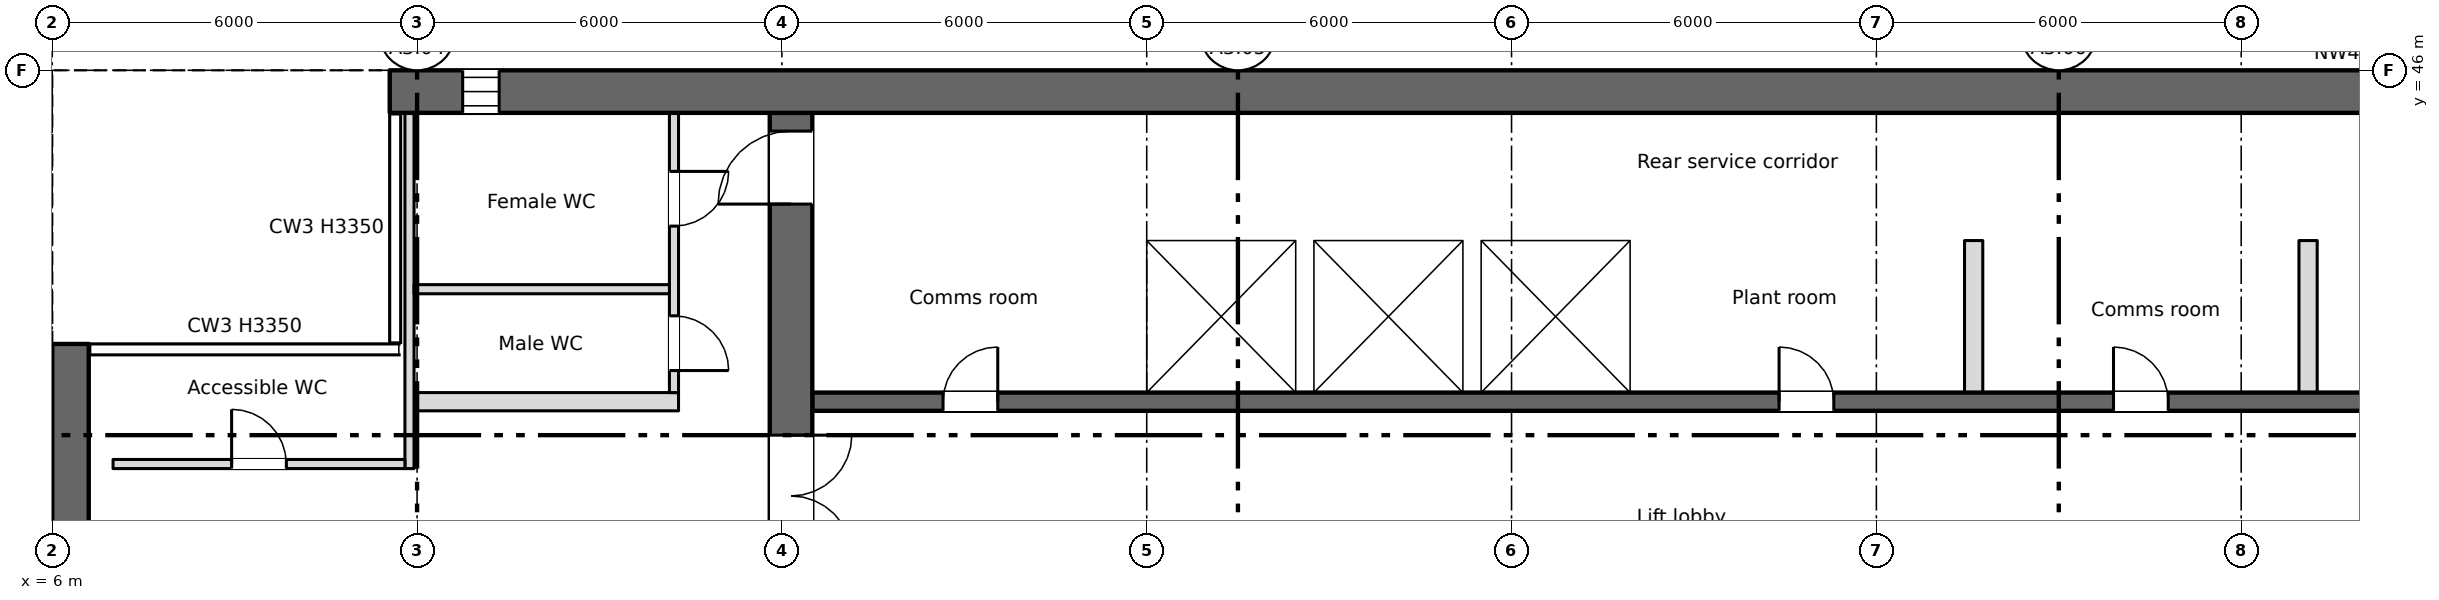
"""IFC4 building model, lengths in metres.
Left out: names, types, materials, properties, quantities, classifications, styles, units other than length and angle.
Written with IfcOpenShell. Run it as: python <this file> out.ifc"""

import sys

from ifc_helpers import new_model, si_unit, direction, frame, frame_2d, origin, place, context, subcontext, project, spatial, rectangle, extrude, element, fill, save


model = new_model("IFC4")
c1 = context("Model", 3, precision=1e-05, world=origin(), true_north=direction((0.0, 1.0)))
c2 = subcontext(c1, "Body", "Model", "MODEL_VIEW")
j1 = project(units=[si_unit("LENGTHUNIT", "METRE"), si_unit("PLANEANGLEUNIT", "RADIAN")], contexts=[c1])
p1 = place(None, origin())
s1 = spatial("IfcSite", under=j1, at=p1, CompositionType="ELEMENT")
p2 = place(p1, origin())
s2 = spatial("IfcBuilding", under=s1, at=p2, CompositionType="ELEMENT")
p3 = place(p2, frame((0.0, 0.0, 185.5)))
s3 = spatial("IfcBuildingStorey", under=s2, at=p3, CompositionType="ELEMENT", Elevation=185.5)
p4 = place(p3, frame((6.3, 7.5, 0.0), z_axis=(0.0, 0.0, 1.0), x_axis=(0.0, 1.0, 0.0)))
e1 = element("IfcWall", 1, at=p4, inside=s3, PredefinedType="SHEAR", context=c2, shape_type="SweptSolid", body=[
    extrude(rectangle(XDim=34.0, YDim=0.6, at=frame_2d((17.0, 0.0))), origin(), (0.0, 0.0, 1.0), 3.35),
])
p5 = place(p4, frame((1.2, 0.0, 0.6)))
e2 = element("IfcOpeningElement", 2, at=p5, cuts=e1, PredefinedType="OPENING", context=c2, shape_type="SweptSolid", body=[
    extrude(rectangle(XDim=0.6, YDim=2.4, at=frame_2d((0.3, 1.2))), frame((0.0, 0.31, 0.0), z_axis=(0.0, -1.0, 0.0), x_axis=(1.0, 0.0, 0.0)), (0.0, 0.0, 1.0), 0.62),
])
p6 = place(p4, frame((7.2, 0.0, 0.6)))
e3 = element("IfcOpeningElement", 3, at=p6, cuts=e1, PredefinedType="OPENING", context=c2, shape_type="SweptSolid", body=[
    extrude(rectangle(XDim=0.6, YDim=2.4, at=frame_2d((0.3, 1.2))), frame((0.0, 0.31, 0.0), z_axis=(0.0, -1.0, 0.0), x_axis=(1.0, 0.0, 0.0)), (0.0, 0.0, 1.0), 0.62),
])
p7 = place(p4, frame((13.2, 0.0, 0.6)))
e4 = element("IfcOpeningElement", 4, at=p7, cuts=e1, PredefinedType="OPENING", context=c2, shape_type="SweptSolid", body=[
    extrude(rectangle(XDim=0.6, YDim=2.4, at=frame_2d((0.3, 1.2))), frame((0.0, 0.31, 0.0), z_axis=(0.0, -1.0, 0.0), x_axis=(1.0, 0.0, 0.0)), (0.0, 0.0, 1.0), 0.62),
])
p8 = place(p4, frame((19.2, 0.0, 0.6)))
e5 = element("IfcOpeningElement", 5, at=p8, cuts=e1, PredefinedType="OPENING", context=c2, shape_type="SweptSolid", body=[
    extrude(rectangle(XDim=0.6, YDim=2.4, at=frame_2d((0.3, 1.2))), frame((0.0, 0.31, 0.0), z_axis=(0.0, -1.0, 0.0), x_axis=(1.0, 0.0, 0.0)), (0.0, 0.0, 1.0), 0.62),
])
p9 = place(p3, frame((11.55, 45.65, 0.0), z_axis=(0.0, 0.0, 1.0), x_axis=(1.0, 0.0, 0.0)))
e6 = element("IfcWall", 6, at=p9, inside=s3, PredefinedType="SHEAR", context=c2, shape_type="SweptSolid", body=[
    extrude(rectangle(XDim=54.9, YDim=0.7, at=frame_2d((27.45, 0.0))), origin(), (0.0, 0.0, 1.0), 3.35),
])
p10 = place(p9, frame((1.2, 0.0, 0.6)))
e7 = element("IfcOpeningElement", 7, at=p10, cuts=e6, PredefinedType="OPENING", context=c2, shape_type="SweptSolid", body=[
    extrude(rectangle(XDim=0.6, YDim=2.4, at=frame_2d((0.3, 1.2))), frame((0.0, 0.36, 0.0), z_axis=(0.0, -1.0, 0.0), x_axis=(1.0, 0.0, 0.0)), (0.0, 0.0, 1.0), 0.72),
])
p11 = place(p9, frame((49.2, 0.0, 0.6)))
e8 = element("IfcOpeningElement", 8, at=p11, cuts=e6, PredefinedType="OPENING", context=c2, shape_type="SweptSolid", body=[
    extrude(rectangle(XDim=0.6, YDim=2.4, at=frame_2d((0.3, 1.2))), frame((0.0, 0.36, 0.0), z_axis=(0.0, -1.0, 0.0), x_axis=(1.0, 0.0, 0.0)), (0.0, 0.0, 1.0), 0.72),
])
p12 = place(p3, frame((6.8, 28.4, 0.0), z_axis=(0.0, 0.0, 1.0), x_axis=(0.0, 1.0, 0.0)))
e9 = element("IfcWall", 9, at=p12, inside=s3, PredefinedType="SHEAR", context=c2, shape_type="SweptSolid", body=[
    extrude(rectangle(XDim=12.85, YDim=0.4, at=frame_2d((6.425, 0.0))), origin(), (0.0, 0.0, 1.0), 3.35),
])
p13 = place(p3, frame((18.15, 28.4, 0.0), z_axis=(0.0, 0.0, 1.0), x_axis=(0.0, 1.0, 0.0)))
e10 = element("IfcWall", 10, at=p13, inside=s3, PredefinedType="SHEAR", context=c2, shape_type="SweptSolid", body=[
    extrude(rectangle(XDim=16.9, YDim=0.7, at=frame_2d((8.45, 0.0))), origin(), (0.0, 0.0, 1.0), 3.35),
])
p14 = place(p13, frame((9.6, 0.0, 0.0)))
e11 = element("IfcOpeningElement", 11, at=p14, cuts=e10, PredefinedType="OPENING", context=c2, shape_type="SweptSolid", body=[
    extrude(rectangle(XDim=2.0, YDim=2.1, at=frame_2d((1.0, 1.05))), frame((0.0, 0.36, 0.0), z_axis=(0.0, -1.0, 0.0), x_axis=(1.0, 0.0, 0.0)), (0.0, 0.0, 1.0), 0.72),
])
p15 = place(p13, frame((15.4, 0.0, 0.0)))
e12 = element("IfcOpeningElement", 12, at=p15, cuts=e10, PredefinedType="OPENING", context=c2, shape_type="SweptSolid", body=[
    extrude(rectangle(XDim=1.2, YDim=2.1, at=frame_2d((0.6, 1.05))), frame((0.0, 0.36, 0.0), z_axis=(0.0, -1.0, 0.0), x_axis=(1.0, 0.0, 0.0)), (0.0, 0.0, 1.0), 0.72),
])
p16 = place(p3, frame((18.5, 40.55, 0.0), z_axis=(0.0, 0.0, 1.0), x_axis=(1.0, 0.0, 0.0)))
e13 = element("IfcWall", 13, at=p16, inside=s3, PredefinedType="SHEAR", context=c2, shape_type="SweptSolid", body=[
    extrude(rectangle(XDim=41.0, YDim=0.3, at=frame_2d((20.5, 0.0))), origin(), (0.0, 0.0, 1.0), 3.35),
])
p17 = place(p16, frame((2.15, 0.0, 0.0)))
e14 = element("IfcOpeningElement", 14, at=p17, cuts=e13, PredefinedType="OPENING", context=c2, shape_type="SweptSolid", body=[
    extrude(rectangle(XDim=0.9, YDim=2.1, at=frame_2d((0.45, 1.05))), frame((0.0, 0.16, 0.0), z_axis=(0.0, -1.0, 0.0), x_axis=(1.0, 0.0, 0.0)), (0.0, 0.0, 1.0), 0.32),
])
p18 = place(p16, frame((15.9, 0.0, 0.0)))
e15 = element("IfcOpeningElement", 15, at=p18, cuts=e13, PredefinedType="OPENING", context=c2, shape_type="SweptSolid", body=[
    extrude(rectangle(XDim=0.9, YDim=2.1, at=frame_2d((0.45, 1.05))), frame((0.0, 0.16, 0.0), z_axis=(0.0, -1.0, 0.0), x_axis=(1.0, 0.0, 0.0)), (0.0, 0.0, 1.0), 0.32),
])
p19 = place(p16, frame((21.4, 0.0, 0.0)))
e16 = element("IfcOpeningElement", 16, at=p19, cuts=e13, PredefinedType="OPENING", context=c2, shape_type="SweptSolid", body=[
    extrude(rectangle(XDim=0.9, YDim=2.1, at=frame_2d((0.45, 1.05))), frame((0.0, 0.16, 0.0), z_axis=(0.0, -1.0, 0.0), x_axis=(1.0, 0.0, 0.0)), (0.0, 0.0, 1.0), 0.32),
])
p20 = place(p16, frame((26.9, 0.0, 0.0)))
e17 = element("IfcOpeningElement", 17, at=p20, cuts=e13, PredefinedType="OPENING", context=c2, shape_type="SweptSolid", body=[
    extrude(rectangle(XDim=0.9, YDim=2.1, at=frame_2d((0.45, 1.05))), frame((0.0, 0.16, 0.0), z_axis=(0.0, -1.0, 0.0), x_axis=(1.0, 0.0, 0.0)), (0.0, 0.0, 1.0), 0.32),
])
p21 = place(p16, frame((6.175, 0.0, 0.0)))
e18 = element("IfcOpeningElement", 18, at=p21, cuts=e13, PredefinedType="OPENING", context=c2, shape_type="SweptSolid", body=[
    extrude(rectangle(XDim=1.1, YDim=2.1, at=frame_2d((0.55, 1.05))), frame((0.0, 0.16, 0.0), z_axis=(0.0, -1.0, 0.0), x_axis=(1.0, 0.0, 0.0)), (0.0, 0.0, 1.0), 0.32),
])
p22 = place(p16, frame((8.925, 0.0, 0.0)))
e19 = element("IfcOpeningElement", 19, at=p22, cuts=e13, PredefinedType="OPENING", context=c2, shape_type="SweptSolid", body=[
    extrude(rectangle(XDim=1.1, YDim=2.1, at=frame_2d((0.55, 1.05))), frame((0.0, 0.16, 0.0), z_axis=(0.0, -1.0, 0.0), x_axis=(1.0, 0.0, 0.0)), (0.0, 0.0, 1.0), 0.32),
])
p23 = place(p16, frame((11.675, 0.0, 0.0)))
e20 = element("IfcOpeningElement", 20, at=p23, cuts=e13, PredefinedType="OPENING", context=c2, shape_type="SweptSolid", body=[
    extrude(rectangle(XDim=1.1, YDim=2.1, at=frame_2d((0.55, 1.05))), frame((0.0, 0.16, 0.0), z_axis=(0.0, -1.0, 0.0), x_axis=(1.0, 0.0, 0.0)), (0.0, 0.0, 1.0), 0.32),
])
p24 = place(p16, frame((30.925, 0.0, 0.0)))
e21 = element("IfcOpeningElement", 21, at=p24, cuts=e13, PredefinedType="OPENING", context=c2, shape_type="SweptSolid", body=[
    extrude(rectangle(XDim=1.1, YDim=2.1, at=frame_2d((0.55, 1.05))), frame((0.0, 0.16, 0.0), z_axis=(0.0, -1.0, 0.0), x_axis=(1.0, 0.0, 0.0)), (0.0, 0.0, 1.0), 0.32),
])
p25 = place(p16, frame((33.675, 0.0, 0.0)))
e22 = element("IfcOpeningElement", 22, at=p25, cuts=e13, PredefinedType="OPENING", context=c2, shape_type="SweptSolid", body=[
    extrude(rectangle(XDim=1.1, YDim=2.1, at=frame_2d((0.55, 1.05))), frame((0.0, 0.16, 0.0), z_axis=(0.0, -1.0, 0.0), x_axis=(1.0, 0.0, 0.0)), (0.0, 0.0, 1.0), 0.32),
])
p26 = place(p16, frame((36.375, 0.0, 0.0)))
e23 = element("IfcOpeningElement", 23, at=p26, cuts=e13, PredefinedType="OPENING", context=c2, shape_type="SweptSolid", body=[
    extrude(rectangle(XDim=1.2, YDim=2.1, at=frame_2d((0.6, 1.05))), frame((0.0, 0.16, 0.0), z_axis=(0.0, -1.0, 0.0), x_axis=(1.0, 0.0, 0.0)), (0.0, 0.0, 1.0), 0.32),
])
p27 = place(p16, frame((39.15, 0.0, 0.0)))
e24 = element("IfcOpeningElement", 24, at=p27, cuts=e13, PredefinedType="OPENING", context=c2, shape_type="SweptSolid", body=[
    extrude(rectangle(XDim=1.2, YDim=2.1, at=frame_2d((0.6, 1.05))), frame((0.0, 0.16, 0.0), z_axis=(0.0, -1.0, 0.0), x_axis=(1.0, 0.0, 0.0)), (0.0, 0.0, 1.0), 0.32),
])
p28 = place(p3, frame((18.5, 43.35, 0.0), z_axis=(0.0, 0.0, 1.0), x_axis=(1.0, 0.0, 0.0)))
e25 = element("IfcWall", 25, at=p28, inside=s3, PredefinedType="SHEAR", context=c2, shape_type="SweptSolid", body=[
    extrude(rectangle(XDim=41.0, YDim=0.3, at=frame_2d((20.5, 0.0))), origin(), (0.0, 0.0, 1.0), 3.35),
])
p29 = place(p3, frame((11.95, 40.55, 0.0), z_axis=(0.0, 0.0, 1.0), x_axis=(1.0, 0.0, 0.0)))
e26 = element("IfcWall", 26, at=p29, inside=s3, PredefinedType="PARTITIONING", context=c2, shape_type="SweptSolid", body=[
    extrude(rectangle(XDim=4.35, YDim=0.3, at=frame_2d((2.175, 0.0))), origin(), (0.0, 0.0, 1.0), 3.35),
])
for number, where, z_axis, x_axis in (
    (27, (23.85, 40.7, 0.0), (0.0, 0.0, 1.0), (0.0, 1.0, 0.0)),
    (28, (26.6, 40.7, 0.0), (0.0, 0.0, 1.0), (0.0, 1.0, 0.0)),
    (29, (29.35, 40.7, 0.0), (0.0, 0.0, 1.0), (0.0, 1.0, 0.0)),
    (30, (32.1, 40.7, 0.0), (0.0, 0.0, 1.0), (0.0, 1.0, 0.0)),
):
    element("IfcWall", number, at=place(p3, frame(where, z_axis=z_axis, x_axis=x_axis)), inside=s3, PredefinedType="SHEAR", context=c2, shape_type="SweptSolid", body=[
        extrude(rectangle(XDim=2.5, YDim=0.3, at=frame_2d((1.25, 0.0))), origin(), (0.0, 0.0, 1.0), 3.35),
    ])
p30 = place(p3, frame((16.225, 45.3, 0.0), z_axis=(0.0, 0.0, 1.0), x_axis=(0.0, -1.0, 0.0)))
e31 = element("IfcWall", 31, at=p30, inside=s3, PredefinedType="PARTITIONING", context=c2, shape_type="SweptSolid", body=[
    extrude(rectangle(XDim=4.6, YDim=0.15, at=frame_2d((2.3, 0.0))), origin(), (0.0, 0.0, 1.0), 3.35),
])
p31 = place(p30, frame((3.337, 0.0, 0.0)))
e32 = element("IfcOpeningElement", 32, at=p31, cuts=e31, PredefinedType="OPENING", context=c2, shape_type="SweptSolid", body=[
    extrude(rectangle(XDim=0.9, YDim=2.1, at=frame_2d((0.45, 1.05))), frame((0.0, 0.085, 0.0), z_axis=(0.0, -1.0, 0.0), x_axis=(1.0, 0.0, 0.0)), (0.0, 0.0, 1.0), 0.17),
])
p32 = place(p30, frame((0.962, 0.0, 0.0)))
e33 = element("IfcOpeningElement", 33, at=p32, cuts=e31, PredefinedType="OPENING", context=c2, shape_type="SweptSolid", body=[
    extrude(rectangle(XDim=0.9, YDim=2.1, at=frame_2d((0.45, 1.05))), frame((0.0, 0.085, 0.0), z_axis=(0.0, -1.0, 0.0), x_axis=(1.0, 0.0, 0.0)), (0.0, 0.0, 1.0), 0.17),
])
p33 = place(p3, frame((11.875, 39.45, 0.0), z_axis=(0.0, 0.0, 1.0), x_axis=(0.0, 1.0, 0.0)))
e34 = element("IfcWall", 34, at=p33, inside=s3, PredefinedType="PARTITIONING", context=c2, shape_type="SweptSolid", body=[
    extrude(rectangle(XDim=5.85, YDim=0.15, at=frame_2d((2.925, 0.0))), origin(), (0.0, 0.0, 1.0), 3.35),
])
p34 = place(p3, frame((7.0, 39.525, 0.0), z_axis=(0.0, 0.0, 1.0), x_axis=(1.0, 0.0, 0.0)))
e35 = element("IfcWall", 35, at=p34, inside=s3, PredefinedType="PARTITIONING", context=c2, shape_type="SweptSolid", body=[
    extrude(rectangle(XDim=4.8, YDim=0.15, at=frame_2d((2.4, 0.0))), origin(), (0.0, 0.0, 1.0), 3.35),
])
p35 = place(p34, frame((1.95, 0.0, 0.0)))
e36 = element("IfcOpeningElement", 36, at=p35, cuts=e35, PredefinedType="OPENING", context=c2, shape_type="SweptSolid", body=[
    extrude(rectangle(XDim=0.9, YDim=2.1, at=frame_2d((0.45, 1.05))), frame((0.0, 0.085, 0.0), z_axis=(0.0, -1.0, 0.0), x_axis=(1.0, 0.0, 0.0)), (0.0, 0.0, 1.0), 0.17),
])
p36 = place(p3, frame((11.95, 42.4, 0.0), z_axis=(0.0, 0.0, 1.0), x_axis=(1.0, 0.0, 0.0)))
e37 = element("IfcWall", 37, at=p36, inside=s3, PredefinedType="PARTITIONING", context=c2, shape_type="SweptSolid", body=[
    extrude(rectangle(XDim=4.2, YDim=0.15, at=frame_2d((2.1, 0.0))), origin(), (0.0, 0.0, 1.0), 3.35),
])
for number, where, z_axis, x_axis in (
    (38, (37.6, 40.7, 0.0), (0.0, 0.0, 1.0), (0.0, 1.0, 0.0)),
    (39, (43.1, 40.7, 0.0), (0.0, 0.0, 1.0), (0.0, 1.0, 0.0)),
):
    element("IfcWall", number, at=place(p3, frame(where, z_axis=z_axis, x_axis=x_axis)), inside=s3, PredefinedType="PARTITIONING", context=c2, shape_type="SweptSolid", body=[
        extrude(rectangle(XDim=2.5, YDim=0.3, at=frame_2d((1.25, 0.0))), origin(), (0.0, 0.0, 1.0), 3.35),
    ])
p37 = place(p10, origin())
e40 = element("IfcWindow", 40, at=p37, inside=s3, PartitioningType="SINGLE_PANEL", PredefinedType="WINDOW", context=c2, shape_type="SweptSolid", body=[
    extrude(rectangle(XDim=0.6, YDim=2.4, at=frame_2d((0.3, 1.2))), frame((0.0, 0.03, 0.0), z_axis=(0.0, -1.0, 0.0), x_axis=(1.0, 0.0, 0.0)), (0.0, 0.0, 1.0), 0.06),
])
fill(e7, e40)
p38 = place(p35, origin())
e41 = element("IfcDoor", 41, at=p38, inside=s3, OperationType="SINGLE_SWING_LEFT", PredefinedType="DOOR", context=c2, shape_type="SweptSolid", body=[
    extrude(rectangle(XDim=0.9, YDim=2.1, at=frame_2d((0.45, 1.05))), frame((0.0, 0.025, 0.0), z_axis=(0.0, -1.0, 0.0), x_axis=(1.0, 0.0, 0.0)), (0.0, 0.0, 1.0), 0.05),
])
fill(e36, e41)
p39 = place(p31, origin())
e42 = element("IfcDoor", 42, at=p39, inside=s3, OperationType="SINGLE_SWING_RIGHT", PredefinedType="DOOR", context=c2, shape_type="SweptSolid", body=[
    extrude(rectangle(XDim=0.9, YDim=2.1, at=frame_2d((0.45, 1.05))), frame((0.0, 0.025, 0.0), z_axis=(0.0, -1.0, 0.0), x_axis=(1.0, 0.0, 0.0)), (0.0, 0.0, 1.0), 0.05),
])
fill(e32, e42)
p40 = place(p32, origin())
e43 = element("IfcDoor", 43, at=p40, inside=s3, OperationType="SINGLE_SWING_LEFT", PredefinedType="DOOR", context=c2, shape_type="SweptSolid", body=[
    extrude(rectangle(XDim=0.9, YDim=2.1, at=frame_2d((0.45, 1.05))), frame((0.0, 0.025, 0.0), z_axis=(0.0, -1.0, 0.0), x_axis=(1.0, 0.0, 0.0)), (0.0, 0.0, 1.0), 0.05),
])
fill(e33, e43)
p41 = place(p17, origin())
e44 = element("IfcDoor", 44, at=p41, inside=s3, OperationType="SINGLE_SWING_RIGHT", PredefinedType="DOOR", context=c2, shape_type="SweptSolid", body=[
    extrude(rectangle(XDim=0.9, YDim=2.1, at=frame_2d((0.45, 1.05))), frame((0.0, 0.025, 0.0), z_axis=(0.0, -1.0, 0.0), x_axis=(1.0, 0.0, 0.0)), (0.0, 0.0, 1.0), 0.05),
])
fill(e14, e44)
p42 = place(p18, origin())
e45 = element("IfcDoor", 45, at=p42, inside=s3, OperationType="SINGLE_SWING_LEFT", PredefinedType="DOOR", context=c2, shape_type="SweptSolid", body=[
    extrude(rectangle(XDim=0.9, YDim=2.1, at=frame_2d((0.45, 1.05))), frame((0.0, 0.025, 0.0), z_axis=(0.0, -1.0, 0.0), x_axis=(1.0, 0.0, 0.0)), (0.0, 0.0, 1.0), 0.05),
])
fill(e15, e45)
p43 = place(p19, origin())
e46 = element("IfcDoor", 46, at=p43, inside=s3, OperationType="SINGLE_SWING_LEFT", PredefinedType="DOOR", context=c2, shape_type="SweptSolid", body=[
    extrude(rectangle(XDim=0.9, YDim=2.1, at=frame_2d((0.45, 1.05))), frame((0.0, 0.025, 0.0), z_axis=(0.0, -1.0, 0.0), x_axis=(1.0, 0.0, 0.0)), (0.0, 0.0, 1.0), 0.05),
])
fill(e16, e46)
p44 = place(p21, origin())
e47 = element("IfcDoor", 47, at=p44, inside=s3, OperationType="SLIDING_TO_LEFT", PredefinedType="DOOR", context=c2, shape_type="SweptSolid", body=[
    extrude(rectangle(XDim=1.1, YDim=2.1, at=frame_2d((0.55, 1.05))), frame((0.0, 0.025, 0.0), z_axis=(0.0, -1.0, 0.0), x_axis=(1.0, 0.0, 0.0)), (0.0, 0.0, 1.0), 0.05),
])
fill(e18, e47)
p45 = place(p22, origin())
e48 = element("IfcDoor", 48, at=p45, inside=s3, OperationType="SLIDING_TO_LEFT", PredefinedType="DOOR", context=c2, shape_type="SweptSolid", body=[
    extrude(rectangle(XDim=1.1, YDim=2.1, at=frame_2d((0.55, 1.05))), frame((0.0, 0.025, 0.0), z_axis=(0.0, -1.0, 0.0), x_axis=(1.0, 0.0, 0.0)), (0.0, 0.0, 1.0), 0.05),
])
fill(e19, e48)
p46 = place(p23, origin())
e49 = element("IfcDoor", 49, at=p46, inside=s3, OperationType="SLIDING_TO_LEFT", PredefinedType="DOOR", context=c2, shape_type="SweptSolid", body=[
    extrude(rectangle(XDim=1.1, YDim=2.1, at=frame_2d((0.55, 1.05))), frame((0.0, 0.025, 0.0), z_axis=(0.0, -1.0, 0.0), x_axis=(1.0, 0.0, 0.0)), (0.0, 0.0, 1.0), 0.05),
])
fill(e20, e49)
p47 = place(p14, origin())
e50 = element("IfcDoor", 50, at=p47, inside=s3, OperationType="DOUBLE_DOOR_SINGLE_SWING", PredefinedType="DOOR", context=c2, shape_type="SweptSolid", body=[
    extrude(rectangle(XDim=2.0, YDim=2.1, at=frame_2d((1.0, 1.05))), frame((0.0, 0.025, 0.0), z_axis=(0.0, -1.0, 0.0), x_axis=(1.0, 0.0, 0.0)), (0.0, 0.0, 1.0), 0.05),
])
fill(e11, e50)
p48 = place(p15, origin())
e51 = element("IfcDoor", 51, at=p48, inside=s3, OperationType="SINGLE_SWING_LEFT", PredefinedType="DOOR", context=c2, shape_type="SweptSolid", body=[
    extrude(rectangle(XDim=1.2, YDim=2.1, at=frame_2d((0.6, 1.05))), frame((0.0, 0.025, 0.0), z_axis=(0.0, -1.0, 0.0), x_axis=(1.0, 0.0, 0.0)), (0.0, 0.0, 1.0), 0.05),
])
fill(e12, e51)
save(model, sys.argv[1])
